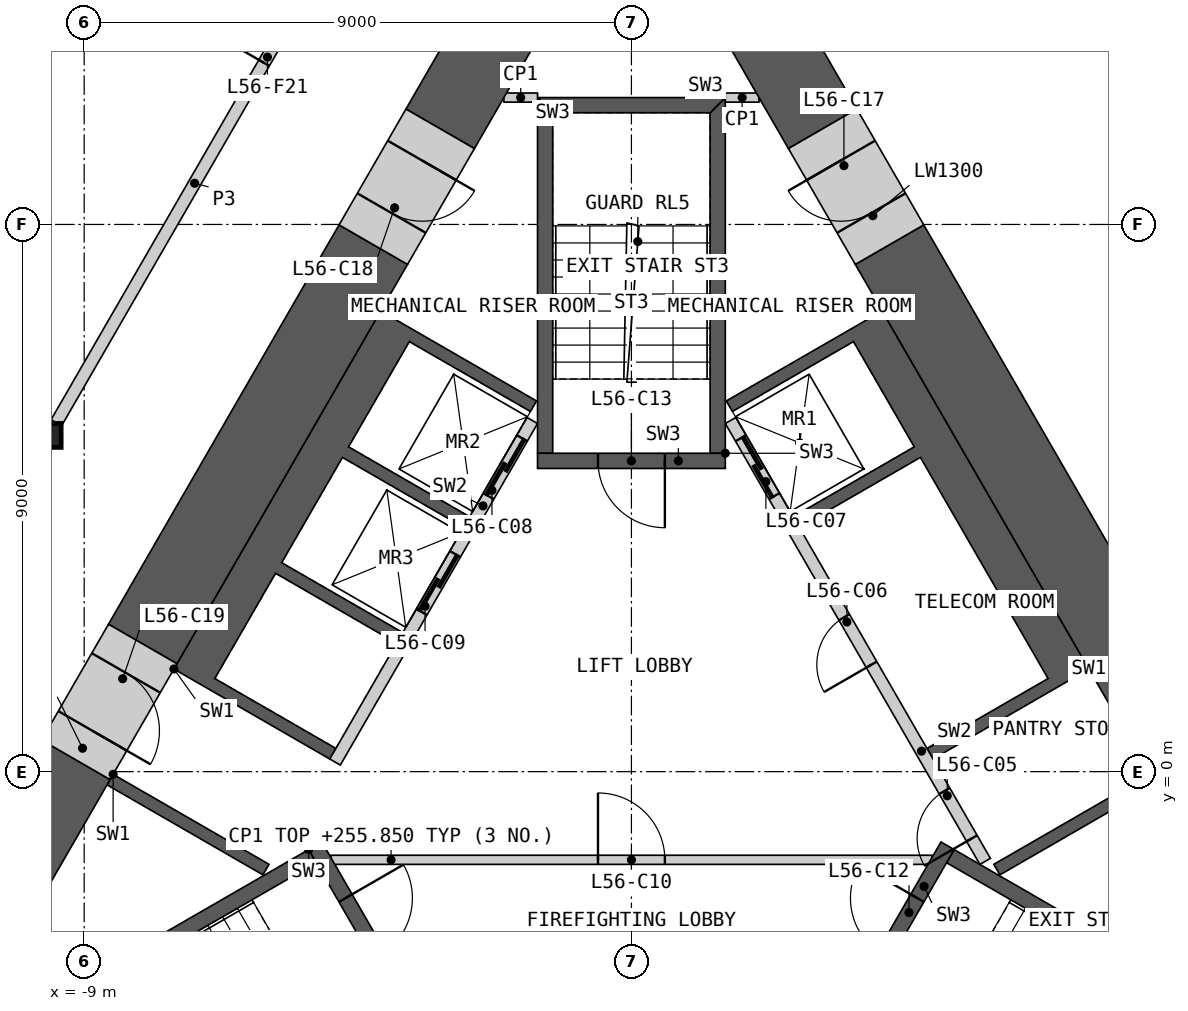
"""IFC4 building model, lengths in metres.
Left out: names, types, materials, properties, quantities, classifications, styles, units other than length and angle.
Written with IfcOpenShell. Run it as: python <this file> out.ifc"""

import sys

from ifc_helpers import new_model, si_unit, direction, frame, frame_2d, origin, origin_2d, place, context, subcontext, project, spatial, polyline, rectangle, i_section, outline, extrude, element, fill, save


model = new_model("IFC4")
c1 = context("Model", 3, precision=1e-05, world=origin(), true_north=direction((0.0, 1.0)))
c2 = subcontext(c1, "Body", "Model", "MODEL_VIEW")
j1 = project(units=[si_unit("LENGTHUNIT", "METRE"), si_unit("PLANEANGLEUNIT", "RADIAN")], contexts=[c1])
p1 = place(None, origin())
s1 = spatial("IfcSite", under=j1, at=p1, CompositionType="ELEMENT")
p2 = place(p1, origin())
s2 = spatial("IfcBuilding", under=s1, at=p2, CompositionType="ELEMENT")
p3 = place(p2, frame((0.0, 0.0, 252.6)))
s3 = spatial("IfcBuildingStorey", under=s2, at=p3, CompositionType="ELEMENT", Elevation=252.6)
p4 = place(p3, frame((-9.578, 5.53, 0.0), z_axis=(0.0, 0.0, 1.0), x_axis=(1.0, 0.0, 0.0)))
e1 = element("IfcColumn", 1, at=p4, inside=s3, PredefinedType="COLUMN", context=c2, shape_type="SweptSolid", body=[
    extrude(i_section(OverallWidth=0.399, OverallDepth=0.393, WebThickness=0.023, FlangeThickness=0.037, at=origin_2d()), origin(), (0.0, 0.0, 1.0), 3.6),
])
p5 = place(p3, origin())
e2 = element("IfcWall", 2, at=p5, inside=s3, PredefinedType="SHEAR", context=c2, shape_type="SweptSolid", body=[
    extrude(outline(polyline([(8.524, -0.044), (8.624, -0.217), (8.231, -0.444), (6.061, -1.697), (5.96, -1.524), (8.131, -0.271), (8.524, -0.044)])), origin(), (0.0, 0.0, 1.0), 3.25),
])
p6 = place(p3, origin())
e3 = element("IfcWall", 3, at=p6, inside=s3, PredefinedType="SHEAR", context=c2, shape_type="SweptSolid", body=[
    extrude(outline(polyline([(7.524, 1.688), (7.131, 1.461), (4.96, 0.208), (4.861, 0.381), (6.852, 1.531), (4.752, 5.169), (2.76, 4.019), (2.66, 4.192), (4.652, 5.342), (3.652, 7.074), (1.66, 5.924), (1.561, 6.097), (3.731, 7.35), (4.124, 7.577), (7.524, 1.688)])), origin(), (0.0, 0.0, 1.0), 3.25),
])
p7 = place(p3, frame((5.817, -1.476, 0.0), z_axis=(0.0, 0.0, 1.0), x_axis=(-0.500002616675, 0.866023893041, 0.0)))
e4 = element("IfcWall", 4, at=p7, inside=s3, PredefinedType="SOLIDWALL", context=c2, shape_type="SweptSolid", body=[
    extrude(rectangle(XDim=8.373, YDim=0.2, at=frame_2d((4.187, 0.0))), origin(), (0.0, 0.0, 1.0), 3.25),
])
p8 = place(p7, frame((0.437, 0.0, 0.0)))
e5 = element("IfcOpeningElement", 5, at=p8, cuts=e4, PredefinedType="OPENING", context=c2, shape_type="SweptSolid", body=[
    extrude(rectangle(XDim=0.9, YDim=2.1, at=frame_2d((0.45, 1.05))), frame((0.0, 0.11, 0.0), z_axis=(0.0, -1.0, 0.0), x_axis=(1.0, 0.0, 0.0)), (0.0, 0.0, 1.0), 0.22),
])
p9 = place(p7, frame((3.737, 0.0, 0.0)))
e6 = element("IfcOpeningElement", 6, at=p9, cuts=e4, PredefinedType="OPENING", context=c2, shape_type="SweptSolid", body=[
    extrude(rectangle(XDim=0.9, YDim=2.1, at=frame_2d((0.45, 1.05))), frame((0.0, 0.11, 0.0), z_axis=(0.0, -1.0, 0.0), x_axis=(1.0, 0.0, 0.0)), (0.0, 0.0, 1.0), 0.22),
])
p10 = place(p7, frame((6.937, 0.0, 0.0)))
e7 = element("IfcOpeningElement", 7, at=p10, cuts=e4, PredefinedType="OPENING", context=c2, shape_type="SweptSolid", body=[
    extrude(rectangle(XDim=1.1, YDim=2.1, at=frame_2d((0.55, 1.05))), frame((0.0, 0.11, 0.0), z_axis=(0.0, -1.0, 0.0), x_axis=(1.0, 0.0, 0.0)), (0.0, 0.0, 1.0), 0.22),
])
p11 = place(p3, origin())
e8 = element("IfcWall", 8, at=p11, inside=s3, PredefinedType="SHEAR", context=c2, shape_type="SweptSolid", body=[
    extrude(outline(polyline([(-7.524, 1.688), (-4.124, 7.577), (-3.731, 7.35), (-1.561, 6.097), (-1.66, 5.924), (-3.652, 7.074), (-4.652, 5.342), (-2.66, 4.192), (-2.76, 4.019), (-4.752, 5.169), (-5.752, 3.437), (-3.76, 2.287), (-3.861, 2.113), (-5.852, 3.263), (-6.852, 1.531), (-4.861, 0.381), (-4.96, 0.208), (-7.131, 1.461), (-7.524, 1.688)])), origin(), (0.0, 0.0, 1.0), 3.25),
])
p12 = place(p3, origin())
e9 = element("IfcWall", 9, at=p12, inside=s3, PredefinedType="SHEAR", context=c2, shape_type="SweptSolid", body=[
    extrude(outline(polyline([(-8.524, -0.044), (-8.131, -0.271), (-5.96, -1.524), (-6.061, -1.697), (-8.231, -0.444), (-8.624, -0.217), (-8.524, -0.044)])), origin(), (0.0, 0.0, 1.0), 3.25),
])
p13 = place(p3, frame((-1.631, 5.776, 0.0), z_axis=(0.0, 0.0, 1.0), x_axis=(-0.499992876559, -0.866029516466, 0.0)))
e10 = element("IfcWall", 10, at=p13, inside=s3, PredefinedType="SOLIDWALL", context=c2, shape_type="SweptSolid", body=[
    extrude(rectangle(XDim=6.486, YDim=0.2, at=frame_2d((3.243, 0.0))), origin(), (0.0, 0.0, 1.0), 3.25),
])
p14 = place(p13, frame((0.337, 0.0, 0.0)))
e11 = element("IfcOpeningElement", 11, at=p14, cuts=e10, PredefinedType="OPENING", context=c2, shape_type="SweptSolid", body=[
    extrude(rectangle(XDim=1.1, YDim=2.1, at=frame_2d((0.55, 1.05))), frame((0.0, 0.11, 0.0), z_axis=(0.0, -1.0, 0.0), x_axis=(1.0, 0.0, 0.0)), (0.0, 0.0, 1.0), 0.22),
])
p15 = place(p13, frame((2.537, 0.0, 0.0)))
e12 = element("IfcOpeningElement", 12, at=p15, cuts=e10, PredefinedType="OPENING", context=c2, shape_type="SweptSolid", body=[
    extrude(rectangle(XDim=1.1, YDim=2.1, at=frame_2d((0.55, 1.05))), frame((0.0, 0.11, 0.0), z_axis=(0.0, -1.0, 0.0), x_axis=(1.0, 0.0, 0.0)), (0.0, 0.0, 1.0), 0.22),
])
p16 = place(p3, frame((-4.941, -1.45, 0.0), z_axis=(0.0, 0.0, 1.0), x_axis=(1.0, 0.0, 0.0)))
e13 = element("IfcWall", 13, at=p16, inside=s3, PredefinedType="PARTITIONING", context=c2, shape_type="SweptSolid", body=[
    extrude(rectangle(XDim=9.882, YDim=0.15, at=frame_2d((4.941, 0.0))), origin(), (0.0, 0.0, 1.0), 3.25),
])
p17 = place(p16, frame((4.391, 0.0, 0.0)))
e14 = element("IfcOpeningElement", 14, at=p17, cuts=e13, PredefinedType="OPENING", context=c2, shape_type="SweptSolid", body=[
    extrude(rectangle(XDim=1.1, YDim=2.1, at=frame_2d((0.55, 1.05))), frame((0.0, 0.085, 0.0), z_axis=(0.0, -1.0, 0.0), x_axis=(1.0, 0.0, 0.0)), (0.0, 0.0, 1.0), 0.17),
])
p18 = place(p3, origin())
e15 = element("IfcWall", 15, at=p18, inside=s3, PredefinedType="SHEAR", context=c2, shape_type="SweptSolid", body=[
    extrude(outline(polyline([(-5.307, -1.281), (-10.374, -4.206), (-10.032, -4.298), (-5.182, -1.498), (-5.307, -1.281)])), origin(), (0.0, 0.0, 1.0), 3.25),
])
p19 = place(p3, frame((-5.199, -1.219, 0.0), z_axis=(0.0, 0.0, 1.0), x_axis=(0.499982516597, -0.866035497597, 0.0)))
e16 = element("IfcWall", 16, at=p19, inside=s3, PredefinedType="SHEAR", context=c2, shape_type="SweptSolid", body=[
    extrude(rectangle(XDim=3.088, YDim=0.25, at=frame_2d((1.544, 0.0))), origin(), (0.0, 0.0, 1.0), 3.25),
])
p20 = place(p19, frame((0.994, 0.0, 0.0)))
e17 = element("IfcOpeningElement", 17, at=p20, cuts=e16, PredefinedType="OPENING", context=c2, shape_type="SweptSolid", body=[
    extrude(rectangle(XDim=1.1, YDim=2.1, at=frame_2d((0.55, 1.05))), frame((0.0, 0.135, 0.0), z_axis=(0.0, -1.0, 0.0), x_axis=(1.0, 0.0, 0.0)), (0.0, 0.0, 1.0), 0.27),
])
p21 = place(p3, origin())
e18 = element("IfcWall", 18, at=p21, inside=s3, PredefinedType="SHEAR", context=c2, shape_type="SweptSolid", body=[
    extrude(outline(polyline([(10.032, -4.298), (10.374, -4.206), (5.307, -1.281), (5.182, -1.498), (10.032, -4.298)])), origin(), (0.0, 0.0, 1.0), 3.25),
])
p22 = place(p3, frame((3.655, -3.893, 0.0), z_axis=(0.0, 0.0, 1.0), x_axis=(0.499982516597, 0.866035497597, 0.0)))
e19 = element("IfcWall", 19, at=p22, inside=s3, PredefinedType="SHEAR", context=c2, shape_type="SweptSolid", body=[
    extrude(rectangle(XDim=3.088, YDim=0.25, at=frame_2d((1.544, 0.0))), origin(), (0.0, 0.0, 1.0), 3.25),
])
p23 = place(p22, frame((0.994, 0.0, 0.0)))
e20 = element("IfcOpeningElement", 20, at=p23, cuts=e19, PredefinedType="OPENING", context=c2, shape_type="SweptSolid", body=[
    extrude(rectangle(XDim=1.1, YDim=2.1, at=frame_2d((0.55, 1.05))), frame((0.0, 0.135, 0.0), z_axis=(0.0, -1.0, 0.0), x_axis=(1.0, 0.0, 0.0)), (0.0, 0.0, 1.0), 0.27),
])
p24 = place(p3, origin())
e21 = element("IfcWall", 21, at=p24, inside=s3, PredefinedType="SHEAR", context=c2, shape_type="SweptSolid", body=[
    extrude(outline(polyline([(1.544, 5.237), (1.544, 11.087), (1.294, 10.837), (1.294, 5.237), (1.544, 5.237)])), origin(), (0.0, 0.0, 1.0), 3.25),
])
p25 = place(p3, origin())
e22 = element("IfcWall", 22, at=p25, inside=s3, PredefinedType="SHEAR", context=c2, shape_type="SweptSolid", body=[
    extrude(outline(polyline([(1.544, 11.087), (-1.544, 11.087), (-1.294, 10.837), (1.294, 10.837), (1.544, 11.087)])), origin(), (0.0, 0.0, 1.0), 3.25),
])
p26 = place(p3, origin())
e23 = element("IfcWall", 23, at=p26, inside=s3, PredefinedType="SHEAR", context=c2, shape_type="SweptSolid", body=[
    extrude(outline(polyline([(-1.294, 10.837), (-1.544, 11.087), (-1.544, 5.237), (-1.294, 5.237), (-1.294, 10.837)])), origin(), (0.0, 0.0, 1.0), 3.25),
])
p27 = place(p3, frame((1.544, 5.112, 0.0), z_axis=(0.0, 0.0, 1.0), x_axis=(-1.0, 0.0, 0.0)))
e24 = element("IfcWall", 24, at=p27, inside=s3, PredefinedType="SHEAR", context=c2, shape_type="SweptSolid", body=[
    extrude(rectangle(XDim=3.088, YDim=0.25, at=frame_2d((1.544, 0.0))), origin(), (0.0, 0.0, 1.0), 3.25),
])
p28 = place(p27, frame((0.994, 0.0, 0.0)))
e25 = element("IfcOpeningElement", 25, at=p28, cuts=e24, PredefinedType="OPENING", context=c2, shape_type="SweptSolid", body=[
    extrude(rectangle(XDim=1.1, YDim=2.1, at=frame_2d((0.55, 1.05))), frame((0.0, 0.135, 0.0), z_axis=(0.0, -1.0, 0.0), x_axis=(1.0, 0.0, 0.0)), (0.0, 0.0, 1.0), 0.27),
])
for number, where, z_axis, x_axis in (
    (26, (1.544, 11.087, 0.0), (0.0, 0.0, 1.0), (1.0, 0.0, 0.0)),
    (27, (-1.544, 11.087, 0.0), (0.0, 0.0, 1.0), (-1.0, 0.0, 0.0)),
):
    element("IfcWall", number, at=place(p3, frame(where, z_axis=z_axis, x_axis=x_axis)), inside=s3, PredefinedType="PARTITIONING", context=c2, shape_type="SweptSolid", body=[
        extrude(rectangle(XDim=0.554, YDim=0.15, at=frame_2d((0.277, 0.0))), origin(), (0.0, 0.0, 1.0), 3.25),
    ])
p29 = place(p3, frame((10.081, -1.441, 0.0), z_axis=(0.0, 0.0, 1.0), x_axis=(-0.500006109471, 0.866021876451, 0.0)))
e28 = element("IfcWall", 28, at=p29, inside=s3, PredefinedType="SHEAR", context=c2, shape_type="SweptSolid", body=[
    extrude(rectangle(XDim=11.672, YDim=1.3, at=frame_2d((5.836, 0.0))), origin(), (0.0, 0.0, 1.0), 3.25),
])
p30 = place(p3, frame((3.145, 10.573, 0.0), z_axis=(0.0, 0.0, 1.0), x_axis=(-0.500006371327, 0.866021725266, 0.0)))
e29 = element("IfcWall", 29, at=p30, inside=s3, PredefinedType="SHEAR", context=c2, shape_type="SweptSolid", body=[
    extrude(rectangle(XDim=2.01, YDim=1.3, at=frame_2d((1.005, 0.0))), origin(), (0.0, 0.0, 1.0), 3.25),
])
p31 = place(p3, frame((-4.245, 8.668, 0.0), z_axis=(0.0, 0.0, 1.0), x_axis=(-0.500002971097, -0.866023688414, 0.0)))
e30 = element("IfcWall", 30, at=p31, inside=s3, PredefinedType="SHEAR", context=c2, shape_type="SweptSolid", body=[
    extrude(rectangle(XDim=7.584, YDim=1.3, at=frame_2d((3.792, 0.0))), origin(), (0.0, 0.0, 1.0), 3.25),
])
p32 = place(p3, frame((-0.563, 15.045, 0.0), z_axis=(0.0, 0.0, 1.0), x_axis=(-0.499982995661, -0.866035221021, 0.0)))
e31 = element("IfcWall", 31, at=p32, inside=s3, PredefinedType="SHEAR", context=c2, shape_type="SweptSolid", body=[
    extrude(rectangle(XDim=5.164, YDim=1.3, at=frame_2d((2.582, 0.0))), origin(), (0.0, 0.0, 1.0), 3.25),
])
p33 = place(p3, frame((-9.137, 0.195, 0.0), z_axis=(0.0, 0.0, 1.0), x_axis=(-0.499985697398, -0.866033661238, 0.0)))
e32 = element("IfcWall", 32, at=p33, inside=s3, PredefinedType="SHEAR", context=c2, shape_type="SweptSolid", body=[
    extrude(rectangle(XDim=4.362, YDim=1.3, at=frame_2d((2.181, 0.0))), origin(), (0.0, 0.0, 1.0), 3.25),
])
p34 = place(p3, frame((4.245, 8.668, 0.0), z_axis=(0.0, 0.0, 1.0), x_axis=(-0.50002983664, 0.866008176907, 0.0)))
e33 = element("IfcWall", 33, at=p34, inside=s3, PredefinedType="SHEAR", context=c2, shape_type="SweptSolid", body=[
    extrude(rectangle(XDim=2.2, YDim=1.3, at=frame_2d((1.1, 0.0))), origin(), (0.0, 0.0, 1.0), 3.25),
])
p35 = place(p34, frame((0.6, 0.0, 0.0)))
e34 = element("IfcOpeningElement", 34, at=p35, cuts=e33, PredefinedType="OPENING", context=c2, shape_type="SweptSolid", body=[
    extrude(rectangle(XDim=1.0, YDim=2.1, at=frame_2d((0.5, 1.05))), frame((0.0, 0.66, 0.0), z_axis=(0.0, -1.0, 0.0), x_axis=(1.0, 0.0, 0.0)), (0.0, 0.0, 1.0), 1.32),
])
p36 = place(p3, frame((-3.145, 10.573, 0.0), z_axis=(0.0, 0.0, 1.0), x_axis=(-0.50002983664, -0.866008176907, 0.0)))
e35 = element("IfcWall", 35, at=p36, inside=s3, PredefinedType="SHEAR", context=c2, shape_type="SweptSolid", body=[
    extrude(rectangle(XDim=2.2, YDim=1.3, at=frame_2d((1.1, 0.0))), origin(), (0.0, 0.0, 1.0), 3.25),
])
p37 = place(p36, frame((0.6, 0.0, 0.0)))
e36 = element("IfcOpeningElement", 36, at=p37, cuts=e35, PredefinedType="OPENING", context=c2, shape_type="SweptSolid", body=[
    extrude(rectangle(XDim=1.0, YDim=2.1, at=frame_2d((0.5, 1.05))), frame((0.0, 0.66, 0.0), z_axis=(0.0, -1.0, 0.0), x_axis=(1.0, 0.0, 0.0)), (0.0, 0.0, 1.0), 1.32),
])
p38 = place(p3, frame((-8.037, 2.1, 0.0), z_axis=(0.0, 0.0, 1.0), x_axis=(-0.50002983664, -0.866008176907, 0.0)))
e37 = element("IfcWall", 37, at=p38, inside=s3, PredefinedType="SHEAR", context=c2, shape_type="SweptSolid", body=[
    extrude(rectangle(XDim=2.2, YDim=1.3, at=frame_2d((1.1, 0.0))), origin(), (0.0, 0.0, 1.0), 3.25),
])
p39 = place(p38, frame((0.55, 0.0, 0.0)))
e38 = element("IfcOpeningElement", 38, at=p39, cuts=e37, PredefinedType="OPENING", context=c2, shape_type="SweptSolid", body=[
    extrude(rectangle(XDim=1.1, YDim=2.1, at=frame_2d((0.55, 1.05))), frame((0.0, 0.66, 0.0), z_axis=(0.0, -1.0, 0.0), x_axis=(1.0, 0.0, 0.0)), (0.0, 0.0, 1.0), 1.32),
])
p40 = place(p3, frame((5.377, 18.807, 0.0), z_axis=(0.0, 0.0, 1.0), x_axis=(0.499999852422, -0.866025488988, 0.0)))
e39 = element("IfcWall", 39, at=p40, inside=s3, PredefinedType="PARTITIONING", context=c2, shape_type="SweptSolid", body=[
    extrude(rectangle(XDim=27.198, YDim=0.2, at=frame_2d((13.599, 0.0))), origin(), (0.0, 0.0, 1.0), 3.25),
])
p41 = place(p40, frame((25.096, 0.0, 0.0)))
e40 = element("IfcOpeningElement", 40, at=p41, cuts=e39, PredefinedType="OPENING", context=c2, shape_type="SweptSolid", body=[
    extrude(rectangle(XDim=0.95, YDim=2.1, at=frame_2d((0.475, 1.05))), frame((0.0, 0.11, 0.0), z_axis=(0.0, -1.0, 0.0), x_axis=(1.0, 0.0, 0.0)), (0.0, 0.0, 1.0), 0.22),
])
p42 = place(p40, frame((19.122, 0.0, 0.0)))
e41 = element("IfcOpeningElement", 41, at=p42, cuts=e39, PredefinedType="OPENING", context=c2, shape_type="SweptSolid", body=[
    extrude(rectangle(XDim=1.0, YDim=2.1, at=frame_2d((0.5, 1.05))), frame((0.0, 0.11, 0.0), z_axis=(0.0, -1.0, 0.0), x_axis=(1.0, 0.0, 0.0)), (0.0, 0.0, 1.0), 0.22),
])
p43 = place(p40, frame((17.115, 0.0, 0.0)))
e42 = element("IfcOpeningElement", 42, at=p43, cuts=e39, PredefinedType="OPENING", context=c2, shape_type="SweptSolid", body=[
    extrude(rectangle(XDim=1.1, YDim=2.1, at=frame_2d((0.55, 1.05))), frame((0.0, 0.11, 0.0), z_axis=(0.0, -1.0, 0.0), x_axis=(1.0, 0.0, 0.0)), (0.0, 0.0, 1.0), 0.22),
])
p44 = place(p40, frame((0.35, 0.0, 0.0)))
e43 = element("IfcOpeningElement", 43, at=p44, cuts=e39, PredefinedType="OPENING", context=c2, shape_type="SweptSolid", body=[
    extrude(rectangle(XDim=1.1, YDim=2.1, at=frame_2d((0.55, 1.05))), frame((0.0, 0.11, 0.0), z_axis=(0.0, -1.0, 0.0), x_axis=(1.0, 0.0, 0.0)), (0.0, 0.0, 1.0), 0.22),
])
p45 = place(p3, frame((-9.458, 5.74, 0.0), z_axis=(0.0, 0.0, 1.0), x_axis=(0.50000207303, 0.866024206917, 0.0)))
e44 = element("IfcWall", 44, at=p45, inside=s3, PredefinedType="PARTITIONING", context=c2, shape_type="SweptSolid", body=[
    extrude(rectangle(XDim=9.095, YDim=0.2, at=frame_2d((4.547, 0.0))), origin(), (0.0, 0.0, 1.0), 3.25),
])
p46 = place(p45, frame((6.833, 0.0, 0.0)))
e45 = element("IfcOpeningElement", 45, at=p46, cuts=e44, PredefinedType="OPENING", context=c2, shape_type="SweptSolid", body=[
    extrude(rectangle(XDim=1.1, YDim=2.1, at=frame_2d((0.55, 1.05))), frame((0.0, 0.11, 0.0), z_axis=(0.0, -1.0, 0.0), x_axis=(1.0, 0.0, 0.0)), (0.0, 0.0, 1.0), 0.22),
])
p47 = place(p8, origin())
e46 = element("IfcDoor", 46, at=p47, inside=s3, OperationType="SINGLE_SWING_LEFT", PredefinedType="DOOR", context=c2, shape_type="SweptSolid", body=[
    extrude(rectangle(XDim=0.9, YDim=2.1, at=frame_2d((0.45, 1.05))), frame((0.0, 0.025, 0.0), z_axis=(0.0, -1.0, 0.0), x_axis=(1.0, 0.0, 0.0)), (0.0, 0.0, 1.0), 0.05),
])
fill(e5, e46)
p48 = place(p9, origin())
e47 = element("IfcDoor", 47, at=p48, inside=s3, OperationType="SINGLE_SWING_LEFT", PredefinedType="DOOR", context=c2, shape_type="SweptSolid", body=[
    extrude(rectangle(XDim=0.9, YDim=2.1, at=frame_2d((0.45, 1.05))), frame((0.0, 0.025, 0.0), z_axis=(0.0, -1.0, 0.0), x_axis=(1.0, 0.0, 0.0)), (0.0, 0.0, 1.0), 0.05),
])
fill(e6, e47)
p49 = place(p10, origin())
e48 = element("IfcDoor", 48, at=p49, inside=s3, OperationType="SLIDING_TO_LEFT", PredefinedType="DOOR", context=c2, shape_type="SweptSolid", body=[
    extrude(rectangle(XDim=1.1, YDim=2.1, at=frame_2d((0.55, 1.05))), frame((0.0, 0.025, 0.0), z_axis=(0.0, -1.0, 0.0), x_axis=(1.0, 0.0, 0.0)), (0.0, 0.0, 1.0), 0.05),
])
fill(e7, e48)
p50 = place(p14, origin())
e49 = element("IfcDoor", 49, at=p50, inside=s3, OperationType="SLIDING_TO_LEFT", PredefinedType="DOOR", context=c2, shape_type="SweptSolid", body=[
    extrude(rectangle(XDim=1.1, YDim=2.1, at=frame_2d((0.55, 1.05))), frame((0.0, 0.025, 0.0), z_axis=(0.0, -1.0, 0.0), x_axis=(1.0, 0.0, 0.0)), (0.0, 0.0, 1.0), 0.05),
])
fill(e11, e49)
p51 = place(p15, origin())
e50 = element("IfcDoor", 50, at=p51, inside=s3, OperationType="SLIDING_TO_LEFT", PredefinedType="DOOR", context=c2, shape_type="SweptSolid", body=[
    extrude(rectangle(XDim=1.1, YDim=2.1, at=frame_2d((0.55, 1.05))), frame((0.0, 0.025, 0.0), z_axis=(0.0, -1.0, 0.0), x_axis=(1.0, 0.0, 0.0)), (0.0, 0.0, 1.0), 0.05),
])
fill(e12, e50)
p52 = place(p17, origin())
e51 = element("IfcDoor", 51, at=p52, inside=s3, OperationType="SINGLE_SWING_LEFT", PredefinedType="DOOR", context=c2, shape_type="SweptSolid", body=[
    extrude(rectangle(XDim=1.1, YDim=2.1, at=frame_2d((0.55, 1.05))), frame((0.0, 0.025, 0.0), z_axis=(0.0, -1.0, 0.0), x_axis=(1.0, 0.0, 0.0)), (0.0, 0.0, 1.0), 0.05),
])
fill(e14, e51)
p53 = place(p20, origin())
e52 = element("IfcDoor", 52, at=p53, inside=s3, OperationType="SINGLE_SWING_LEFT", PredefinedType="DOOR", context=c2, shape_type="SweptSolid", body=[
    extrude(rectangle(XDim=1.1, YDim=2.1, at=frame_2d((0.55, 1.05))), frame((0.0, 0.025, 0.0), z_axis=(0.0, -1.0, 0.0), x_axis=(1.0, 0.0, 0.0)), (0.0, 0.0, 1.0), 0.05),
])
fill(e17, e52)
p54 = place(p23, origin())
e53 = element("IfcDoor", 53, at=p54, inside=s3, OperationType="SINGLE_SWING_RIGHT", PredefinedType="DOOR", context=c2, shape_type="SweptSolid", body=[
    extrude(rectangle(XDim=1.1, YDim=2.1, at=frame_2d((0.55, 1.05))), frame((0.0, 0.025, 0.0), z_axis=(0.0, -1.0, 0.0), x_axis=(1.0, 0.0, 0.0)), (0.0, 0.0, 1.0), 0.05),
])
fill(e20, e53)
p55 = place(p28, origin())
e54 = element("IfcDoor", 54, at=p55, inside=s3, OperationType="SINGLE_SWING_LEFT", PredefinedType="DOOR", context=c2, shape_type="SweptSolid", body=[
    extrude(rectangle(XDim=1.1, YDim=2.1, at=frame_2d((0.55, 1.05))), frame((0.0, 0.025, 0.0), z_axis=(0.0, -1.0, 0.0), x_axis=(1.0, 0.0, 0.0)), (0.0, 0.0, 1.0), 0.05),
])
fill(e25, e54)
p56 = place(p35, origin())
e55 = element("IfcDoor", 55, at=p56, inside=s3, OperationType="SINGLE_SWING_RIGHT", PredefinedType="DOOR", context=c2, shape_type="SweptSolid", body=[
    extrude(rectangle(XDim=1.0, YDim=2.1, at=frame_2d((0.5, 1.05))), frame((0.0, 0.405, 0.0), z_axis=(0.0, -1.0, 0.0), x_axis=(1.0, 0.0, 0.0)), (0.0, 0.0, 1.0), 0.05),
])
fill(e34, e55)
p57 = place(p37, origin())
e56 = element("IfcDoor", 56, at=p57, inside=s3, OperationType="SINGLE_SWING_LEFT", PredefinedType="DOOR", context=c2, shape_type="SweptSolid", body=[
    extrude(rectangle(XDim=1.0, YDim=2.1, at=frame_2d((0.5, 1.05))), frame((0.0, 0.405, 0.0), z_axis=(0.0, -1.0, 0.0), x_axis=(1.0, 0.0, 0.0)), (0.0, 0.0, 1.0), 0.05),
])
fill(e36, e56)
p58 = place(p39, origin())
e57 = element("IfcDoor", 57, at=p58, inside=s3, OperationType="SINGLE_SWING_RIGHT", PredefinedType="DOOR", context=c2, shape_type="SweptSolid", body=[
    extrude(rectangle(XDim=1.1, YDim=2.1, at=frame_2d((0.55, 1.05))), frame((0.0, 0.405, 0.0), z_axis=(0.0, -1.0, 0.0), x_axis=(1.0, 0.0, 0.0)), (0.0, 0.0, 1.0), 0.05),
])
fill(e38, e57)
p59 = place(p46, origin())
e58 = element("IfcDoor", 58, at=p59, inside=s3, OperationType="SINGLE_SWING_LEFT", PredefinedType="DOOR", context=c2, shape_type="SweptSolid", body=[
    extrude(rectangle(XDim=1.1, YDim=2.1, at=frame_2d((0.55, 1.05))), frame((0.0, 0.025, 0.0), z_axis=(0.0, -1.0, 0.0), x_axis=(1.0, 0.0, 0.0)), (0.0, 0.0, 1.0), 0.05),
])
fill(e45, e58)
save(model, sys.argv[1])
